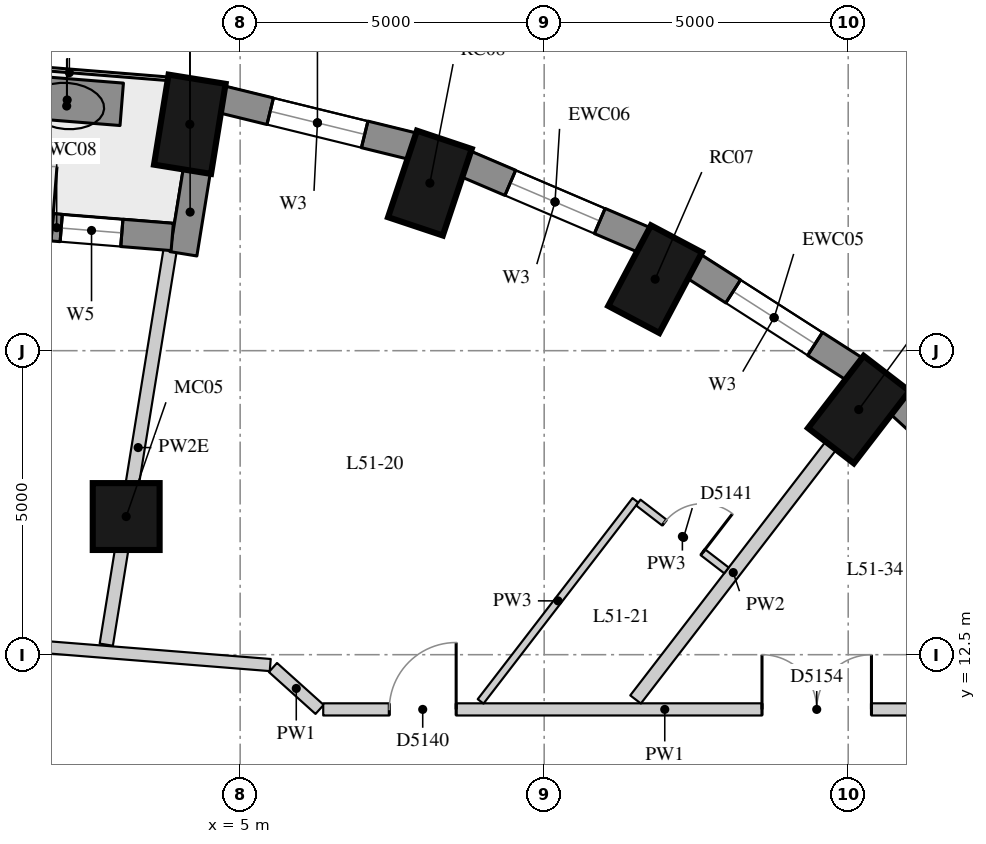
"""IFC4 building model, lengths in metres.
Left out: names, types, materials, properties, quantities, classifications, styles, units other than length and angle.
Written with IfcOpenShell. Run it as: python <this file> out.ifc"""

import sys

from ifc_helpers import new_model, si_unit, direction, frame, frame_2d, origin, origin_2d, place, context, subcontext, project, spatial, rectangle, extrude, element, fill, save


model = new_model("IFC4")
c1 = context("Model", 3, precision=1e-05, world=origin(), true_north=direction((0.0, 1.0)))
c2 = subcontext(c1, "Body", "Model", "MODEL_VIEW")
j1 = project(units=[si_unit("LENGTHUNIT", "METRE"), si_unit("PLANEANGLEUNIT", "RADIAN")], contexts=[c1])
p1 = place(None, origin())
s1 = spatial("IfcSite", under=j1, at=p1, CompositionType="ELEMENT")
p2 = place(p1, origin())
s2 = spatial("IfcBuilding", under=s1, at=p2, CompositionType="ELEMENT")
p3 = place(p2, frame((0.0, 0.0, 181.4)))
s3 = spatial("IfcBuildingStorey", under=s2, at=p3, CompositionType="ELEMENT", Elevation=181.4)
for number, where, z_axis, x_axis in (
    (1, (15.173, 16.532, 0.0), (0.0, 0.0, 1.0), (0.61, 0.792, 0.0)),
    (2, (11.825, 18.676, 0.0), (0.0, 0.0, 1.0), (0.468, 0.884, 0.0)),
    (3, (8.12, 20.256, 0.0), (0.0, 0.0, 1.0), (0.317, 0.949, 0.0)),
    (4, (4.172, 21.224, 0.0), (0.0, 0.0, 1.0), (0.16, 0.987, 0.0)),
):
    element("IfcColumn", number, at=place(p3, frame(where, z_axis=z_axis, x_axis=x_axis)), inside=s3, PredefinedType="COLUMN", context=c2, shape_type="SweptSolid", body=[
        extrude(rectangle(XDim=1.5, YDim=0.95, at=origin_2d()), origin(), (0.0, 0.0, 1.0), 3.3),
    ])
p4 = place(p3, frame((3.126, 14.772, 0.0), z_axis=(0.0, 0.0, 1.0), x_axis=(1.0, 0.0, 0.0)))
e5 = element("IfcColumn", 5, at=p4, inside=s3, PredefinedType="COLUMN", context=c2, shape_type="SweptSolid", body=[
    extrude(rectangle(XDim=1.1, YDim=1.1, at=origin_2d()), origin(), (0.0, 0.0, 1.0), 3.3),
])
p5 = place(p3, frame((18.113, 14.55, 0.0), z_axis=(0.0, 0.0, 1.0), x_axis=(-0.737808755941, 0.675009807082, 0.0)))
e6 = element("IfcWall", 6, at=p5, inside=s3, PredefinedType="SOLIDWALL", context=c2, shape_type="SweptSolid", body=[
    extrude(rectangle(XDim=3.094, YDim=0.45, at=frame_2d((1.547, 0.0))), origin(), (0.0, 0.0, 1.0), 2.85),
])
p6 = place(p3, frame((15.108, 17.193, 0.0), z_axis=(0.0, 0.0, 1.0), x_axis=(-0.842030726237, 0.539429565442, 0.0)))
e7 = element("IfcWall", 7, at=p6, inside=s3, PredefinedType="SOLIDWALL", context=c2, shape_type="SweptSolid", body=[
    extrude(rectangle(XDim=3.151, YDim=0.45, at=frame_2d((1.576, 0.0))), origin(), (0.0, 0.0, 1.0), 2.85),
])
p7 = place(p6, frame((0.776, 0.0, 0.4)))
e8 = element("IfcOpeningElement", 8, at=p7, cuts=e7, PredefinedType="OPENING", context=c2, shape_type="SweptSolid", body=[
    extrude(rectangle(XDim=1.6, YDim=1.75, at=frame_2d((0.8, 0.875))), frame((0.0, 0.235, 0.0), z_axis=(0.0, -1.0, 0.0), x_axis=(1.0, 0.0, 0.0)), (0.0, 0.0, 1.0), 0.47),
])
p8 = place(p3, frame((11.65, 19.319, 0.0), z_axis=(0.0, 0.0, 1.0), x_axis=(-0.91981046949, 0.392362969986, 0.0)))
e9 = element("IfcWall", 9, at=p8, inside=s3, PredefinedType="SOLIDWALL", context=c2, shape_type="SweptSolid", body=[
    extrude(rectangle(XDim=3.201, YDim=0.45, at=frame_2d((1.6, 0.0))), origin(), (0.0, 0.0, 1.0), 2.85),
])
p9 = place(p8, frame((0.8, 0.0, 0.4)))
e10 = element("IfcOpeningElement", 10, at=p9, cuts=e9, PredefinedType="OPENING", context=c2, shape_type="SweptSolid", body=[
    extrude(rectangle(XDim=1.6, YDim=1.75, at=frame_2d((0.8, 0.875))), frame((0.0, 0.235, 0.0), z_axis=(0.0, -1.0, 0.0), x_axis=(1.0, 0.0, 0.0)), (0.0, 0.0, 1.0), 0.47),
])
p10 = place(p3, frame((7.843, 20.862, 0.0), z_axis=(0.0, 0.0, 1.0), x_axis=(-0.971237178372, 0.238114139328, 0.0)))
e11 = element("IfcWall", 11, at=p10, inside=s3, PredefinedType="SOLIDWALL", context=c2, shape_type="SweptSolid", body=[
    extrude(rectangle(XDim=3.237, YDim=0.45, at=frame_2d((1.618, 0.0))), origin(), (0.0, 0.0, 1.0), 2.85),
])
p11 = place(p10, frame((0.818, 0.0, 0.4)))
e12 = element("IfcOpeningElement", 12, at=p11, cuts=e11, PredefinedType="OPENING", context=c2, shape_type="SweptSolid", body=[
    extrude(rectangle(XDim=1.6, YDim=1.75, at=frame_2d((0.8, 0.875))), frame((0.0, 0.235, 0.0), z_axis=(0.0, -1.0, 0.0), x_axis=(1.0, 0.0, 0.0)), (0.0, 0.0, 1.0), 0.47),
])
p12 = place(p3, frame((4.288, 20.466, 0.0), z_axis=(0.0, 0.0, 1.0), x_axis=(-0.159668705775, -0.987170656166, 0.0)))
e13 = element("IfcWall", 13, at=p12, inside=s3, PredefinedType="SOLIDWALL", context=c2, shape_type="SweptSolid", body=[
    extrude(rectangle(XDim=1.39, YDim=0.45, at=frame_2d((0.695, 0.0))), origin(), (0.0, 0.0, 1.0), 2.4),
])
p13 = place(p3, frame((3.883, 19.371, 0.0), z_axis=(0.0, 0.0, 1.0), x_axis=(-0.996792437449, 0.080030223316, 0.0)))
e14 = element("IfcWall", 14, at=p13, inside=s3, PredefinedType="SOLIDWALL", context=c2, shape_type="SweptSolid", body=[
    extrude(rectangle(XDim=3.813, YDim=0.45, at=frame_2d((1.907, 0.0))), origin(), (0.0, 0.0, 1.0), 2.85),
])
p14 = place(p13, frame((0.832, 0.0, 0.4)))
e15 = element("IfcOpeningElement", 15, at=p14, cuts=e14, PredefinedType="OPENING", context=c2, shape_type="SweptSolid", body=[
    extrude(rectangle(XDim=1.0, YDim=1.75, at=frame_2d((0.5, 0.875))), frame((0.0, 0.235, 0.0), z_axis=(0.0, -1.0, 0.0), x_axis=(1.0, 0.0, 0.0)), (0.0, 0.0, 1.0), 0.47),
])
p15 = place(p13, frame((1.982, 0.0, 0.0)))
e16 = element("IfcOpeningElement", 16, at=p15, cuts=e14, PredefinedType="OPENING", context=c2, shape_type="SweptSolid", body=[
    extrude(rectangle(XDim=1.0, YDim=2.15, at=frame_2d((0.5, 1.075))), frame((0.0, 0.235, 0.0), z_axis=(0.0, -1.0, 0.0), x_axis=(1.0, 0.0, 0.0)), (0.0, 0.0, 1.0), 0.47),
])
p16 = place(p3, frame((3.052, 21.552, 0.0), z_axis=(0.0, 0.0, 1.0), x_axis=(-0.996803623311, 0.079890778899, 0.0)))
e17 = element("IfcWall", 17, at=p16, inside=s3, PredefinedType="USERDEFINED", context=c2, shape_type="SweptSolid", body=[
    extrude(rectangle(XDim=1.8, YDim=0.7, at=frame_2d((0.9, 0.0))), origin(), (0.0, 0.0, 1.0), 0.75),
])
p17 = place(p3, frame((-2.589, 12.974, 0.0), z_axis=(0.0, 0.0, 1.0), x_axis=(0.996834299001, -0.079507108712, 0.0)))
e18 = element("IfcWall", 18, at=p17, inside=s3, PredefinedType="PARTITIONING", context=c2, shape_type="SweptSolid", body=[
    extrude(rectangle(XDim=8.11, YDim=0.2, at=frame_2d((4.055, 0.0))), origin(), (0.0, 0.0, 1.0), 2.85),
])
p18 = place(p17, frame((0.14, 0.0, 0.0)))
e19 = element("IfcOpeningElement", 19, at=p18, cuts=e18, PredefinedType="OPENING", context=c2, shape_type="SweptSolid", body=[
    extrude(rectangle(XDim=1.1, YDim=2.1, at=frame_2d((0.55, 1.05))), frame((0.0, 0.11, 0.0), z_axis=(0.0, -1.0, 0.0), x_axis=(1.0, 0.0, 0.0)), (0.0, 0.0, 1.0), 0.22),
])
p19 = place(p3, frame((5.54, 12.289, 0.0), z_axis=(0.0, 0.0, 1.0), x_axis=(0.743647325452, -0.668572101832, 0.0)))
e20 = element("IfcWall", 20, at=p19, inside=s3, PredefinedType="PARTITIONING", context=c2, shape_type="SweptSolid", body=[
    extrude(rectangle(XDim=1.031, YDim=0.2, at=frame_2d((0.515, 0.0))), origin(), (0.0, 0.0, 1.0), 2.85),
])
p20 = place(p3, frame((6.366, 11.6, 0.0), z_axis=(0.0, 0.0, 1.0), x_axis=(1.0, 0.0, 0.0)))
e21 = element("IfcWall", 21, at=p20, inside=s3, PredefinedType="PARTITIONING", context=c2, shape_type="SweptSolid", body=[
    extrude(rectangle(XDim=11.234, YDim=0.2, at=frame_2d((5.617, 0.0))), origin(), (0.0, 0.0, 1.0), 2.85),
])
p21 = place(p20, frame((1.086, 0.0, 0.0)))
e22 = element("IfcOpeningElement", 22, at=p21, cuts=e21, PredefinedType="OPENING", context=c2, shape_type="SweptSolid", body=[
    extrude(rectangle(XDim=1.1, YDim=2.1, at=frame_2d((0.55, 1.05))), frame((0.0, 0.11, 0.0), z_axis=(0.0, -1.0, 0.0), x_axis=(1.0, 0.0, 0.0)), (0.0, 0.0, 1.0), 0.22),
])
p22 = place(p20, frame((7.216, 0.0, 0.0)))
e23 = element("IfcOpeningElement", 23, at=p22, cuts=e21, PredefinedType="OPENING", context=c2, shape_type="SweptSolid", body=[
    extrude(rectangle(XDim=1.8, YDim=2.1, at=frame_2d((0.9, 1.05))), frame((0.0, 0.11, 0.0), z_axis=(0.0, -1.0, 0.0), x_axis=(1.0, 0.0, 0.0)), (0.0, 0.0, 1.0), 0.22),
])
p23 = place(p3, frame((14.716, 15.937, 0.0), z_axis=(0.0, 0.0, 1.0), x_axis=(-0.61000193202, -0.792399926131, 0.0)))
e24 = element("IfcWall", 24, at=p23, inside=s3, PredefinedType="PARTITIONING", context=c2, shape_type="SweptSolid", body=[
    extrude(rectangle(XDim=5.267, YDim=0.22, at=frame_2d((2.634, 0.0))), origin(), (0.0, 0.0, 1.0), 2.85),
])
p24 = place(p3, frame((3.847, 19.148, 0.0), z_axis=(0.0, 0.0, 1.0), x_axis=(-0.159670729912, -0.987170328773, 0.0)))
e25 = element("IfcWall", 25, at=p24, inside=s3, PredefinedType="PARTITIONING", context=c2, shape_type="SweptSolid", body=[
    extrude(rectangle(XDim=6.567, YDim=0.22, at=frame_2d((3.284, 0.0))), origin(), (0.0, 0.0, 1.0), 2.4),
])
p25 = place(p3, frame((8.955, 11.732, 0.0), z_axis=(0.0, 0.0, 1.0), x_axis=(0.609996270026, 0.79240428479, 0.0)))
e26 = element("IfcWall", 26, at=p25, inside=s3, PredefinedType="PARTITIONING", context=c2, shape_type="SweptSolid", body=[
    extrude(rectangle(XDim=4.173, YDim=0.12, at=frame_2d((2.087, 0.0))), origin(), (0.0, 0.0, 1.0), 2.85),
])
p26 = place(p3, frame((11.548, 15.002, 0.0), z_axis=(0.0, 0.0, 1.0), x_axis=(0.792445416108, -0.609942835428, 0.0)))
e27 = element("IfcWall", 27, at=p26, inside=s3, PredefinedType="PARTITIONING", context=c2, shape_type="SweptSolid", body=[
    extrude(rectangle(XDim=1.83, YDim=0.12, at=frame_2d((0.915, 0.0))), origin(), (0.0, 0.0, 1.0), 2.85),
])
p27 = place(p26, frame((0.54, 0.0, 0.0)))
e28 = element("IfcOpeningElement", 28, at=p27, cuts=e27, PredefinedType="OPENING", context=c2, shape_type="SweptSolid", body=[
    extrude(rectangle(XDim=0.8, YDim=2.1, at=frame_2d((0.4, 1.05))), frame((0.0, 0.07, 0.0), z_axis=(0.0, -1.0, 0.0), x_axis=(1.0, 0.0, 0.0)), (0.0, 0.0, 1.0), 0.14),
])
p28 = place(p7, origin())
e29 = element("IfcWindow", 29, at=p28, inside=s3, PartitioningType="SINGLE_PANEL", PredefinedType="WINDOW", context=c2, shape_type="SweptSolid", body=[
    extrude(rectangle(XDim=1.6, YDim=1.75, at=frame_2d((0.8, 0.875))), frame((0.0, 0.035, 0.0), z_axis=(0.0, -1.0, 0.0), x_axis=(1.0, 0.0, 0.0)), (0.0, 0.0, 1.0), 0.06),
])
fill(e8, e29)
p29 = place(p9, origin())
e30 = element("IfcWindow", 30, at=p29, inside=s3, PartitioningType="SINGLE_PANEL", PredefinedType="WINDOW", context=c2, shape_type="SweptSolid", body=[
    extrude(rectangle(XDim=1.6, YDim=1.75, at=frame_2d((0.8, 0.875))), frame((0.0, 0.035, 0.0), z_axis=(0.0, -1.0, 0.0), x_axis=(1.0, 0.0, 0.0)), (0.0, 0.0, 1.0), 0.06),
])
fill(e10, e30)
p30 = place(p11, origin())
e31 = element("IfcWindow", 31, at=p30, inside=s3, PartitioningType="SINGLE_PANEL", PredefinedType="WINDOW", context=c2, shape_type="SweptSolid", body=[
    extrude(rectangle(XDim=1.6, YDim=1.75, at=frame_2d((0.8, 0.875))), frame((0.0, 0.035, 0.0), z_axis=(0.0, -1.0, 0.0), x_axis=(1.0, 0.0, 0.0)), (0.0, 0.0, 1.0), 0.06),
])
fill(e12, e31)
p31 = place(p14, origin())
e32 = element("IfcWindow", 32, at=p31, inside=s3, PartitioningType="SINGLE_PANEL", PredefinedType="WINDOW", context=c2, shape_type="SweptSolid", body=[
    extrude(rectangle(XDim=1.0, YDim=1.75, at=frame_2d((0.5, 0.875))), frame((0.0, 0.035, 0.0), z_axis=(0.0, -1.0, 0.0), x_axis=(1.0, 0.0, 0.0)), (0.0, 0.0, 1.0), 0.06),
])
fill(e15, e32)
p32 = place(p15, frame((1.0, 0.0, 0.0), z_axis=(0.0, 0.0, 1.0), x_axis=(-1.0, 0.0, 0.0)))
e33 = element("IfcDoor", 33, at=p32, inside=s3, OperationType="SINGLE_SWING_RIGHT", PredefinedType="DOOR", context=c2, shape_type="SweptSolid", body=[
    extrude(rectangle(XDim=1.0, YDim=2.15, at=frame_2d((0.5, 1.075))), frame((0.0, 0.075, 0.0), z_axis=(0.0, -1.0, 0.0), x_axis=(1.0, 0.0, 0.0)), (0.0, 0.0, 1.0), 0.05),
])
fill(e16, e33)
p33 = place(p21, origin())
e34 = element("IfcDoor", 34, at=p33, inside=s3, OperationType="SINGLE_SWING_RIGHT", PredefinedType="DOOR", context=c2, shape_type="SweptSolid", body=[
    extrude(rectangle(XDim=1.1, YDim=2.1, at=frame_2d((0.55, 1.05))), frame((0.0, 0.025, 0.0), z_axis=(0.0, -1.0, 0.0), x_axis=(1.0, 0.0, 0.0)), (0.0, 0.0, 1.0), 0.05),
])
fill(e22, e34)
p34 = place(p27, origin())
e35 = element("IfcDoor", 35, at=p34, inside=s3, OperationType="SINGLE_SWING_RIGHT", PredefinedType="DOOR", context=c2, shape_type="SweptSolid", body=[
    extrude(rectangle(XDim=0.8, YDim=2.1, at=frame_2d((0.4, 1.05))), frame((0.0, 0.025, 0.0), z_axis=(0.0, -1.0, 0.0), x_axis=(1.0, 0.0, 0.0)), (0.0, 0.0, 1.0), 0.05),
])
fill(e28, e35)
p35 = place(p22, origin())
e36 = element("IfcDoor", 36, at=p35, inside=s3, OperationType="DOUBLE_DOOR_SINGLE_SWING", PredefinedType="DOOR", context=c2, shape_type="SweptSolid", body=[
    extrude(rectangle(XDim=1.8, YDim=2.1, at=frame_2d((0.9, 1.05))), frame((0.0, 0.025, 0.0), z_axis=(0.0, -1.0, 0.0), x_axis=(1.0, 0.0, 0.0)), (0.0, 0.0, 1.0), 0.05),
])
fill(e23, e36)
save(model, sys.argv[1])
